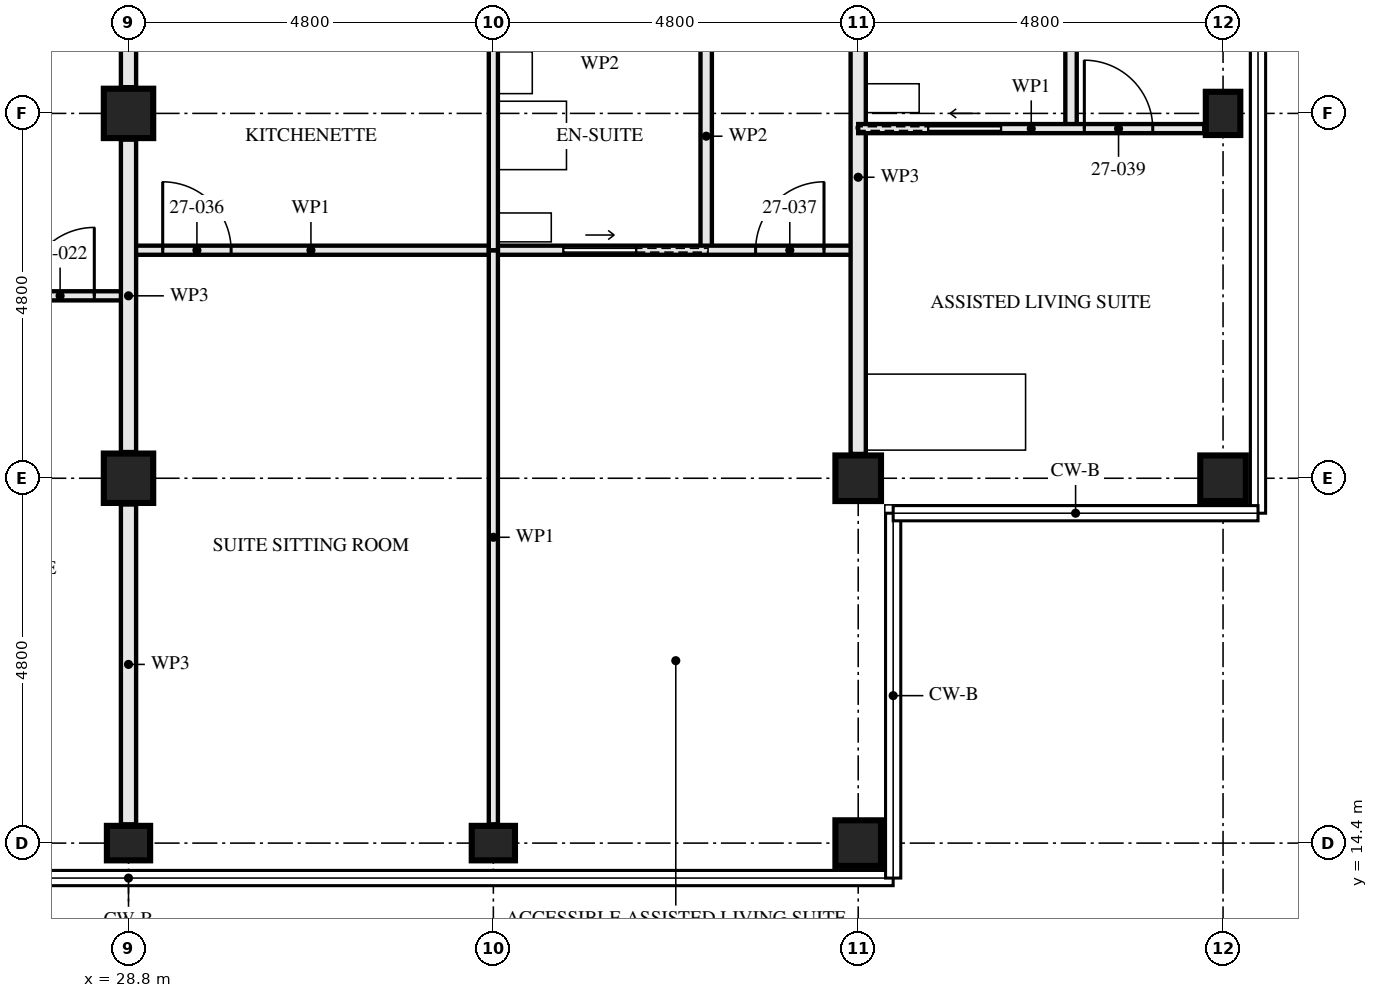
"""IFC4 building model, lengths in metres.
Left out: names, types, materials, properties, quantities, classifications, styles, units other than length and angle.
Written with IfcOpenShell. Run it as: python <this file> out.ifc"""

import sys

from ifc_helpers import new_model, si_unit, direction, frame, frame_2d, origin, origin_2d, place, context, subcontext, project, spatial, rectangle, hollow_rectangle, i_section, extrude, element, fill, save


model = new_model("IFC4")
c1 = context("Model", 3, precision=1e-05, world=origin(), true_north=direction((0.0, 1.0)))
c2 = subcontext(c1, "Body", "Model", "MODEL_VIEW")
j1 = project(units=[si_unit("LENGTHUNIT", "METRE"), si_unit("PLANEANGLEUNIT", "RADIAN")], contexts=[c1])
p1 = place(None, origin())
s1 = spatial("IfcSite", under=j1, at=p1, CompositionType="ELEMENT")
p2 = place(p1, origin())
s2 = spatial("IfcBuilding", under=s1, at=p2, CompositionType="ELEMENT")
p3 = place(p2, frame((0.0, 0.0, 101.5)))
s3 = spatial("IfcBuildingStorey", under=s2, at=p3, CompositionType="ELEMENT", Elevation=101.5)
p4 = place(p3, frame((28.8, 14.4, 0.0), z_axis=(0.0, 0.0, 1.0), x_axis=(0.0, 1.0, 0.0)))
e1 = element("IfcColumn", 1, at=p4, inside=s3, PredefinedType="COLUMN", context=c2, shape_type="SweptSolid", body=[
    extrude(i_section(OverallWidth=0.454, OverallDepth=0.569, WebThickness=0.078, FlangeThickness=0.125, FilletRadius=0.015, at=origin_2d()), origin(), (0.0, 0.0, 1.0), 3.5),
])
for number, where, z_axis, x_axis in (
    (2, (28.8, 19.2, 0.0), (0.0, 0.0, 1.0), (1.0, 0.0, 0.0)),
    (3, (28.8, 24.0, 0.0), (0.0, 0.0, 1.0), (1.0, 0.0, 0.0)),
):
    element("IfcColumn", number, at=place(p3, frame(where, z_axis=z_axis, x_axis=x_axis)), inside=s3, PredefinedType="COLUMN", context=c2, shape_type="SweptSolid", body=[
        extrude(hollow_rectangle(XDim=0.65, YDim=0.65, WallThickness=0.05, at=origin_2d()), origin(), (0.0, 0.0, 1.0), 3.5),
    ])
p5 = place(p3, frame((33.6, 14.4, 0.0), z_axis=(0.0, 0.0, 1.0), x_axis=(0.0, 1.0, 0.0)))
e4 = element("IfcColumn", 4, at=p5, inside=s3, PredefinedType="COLUMN", context=c2, shape_type="SweptSolid", body=[
    extrude(i_section(OverallWidth=0.454, OverallDepth=0.569, WebThickness=0.078, FlangeThickness=0.125, FilletRadius=0.015, at=origin_2d()), origin(), (0.0, 0.0, 1.0), 3.5),
])
for number, where, z_axis, x_axis in (
    (5, (38.4, 14.4, 0.0), (0.0, 0.0, 1.0), (0.0, 1.0, 0.0)),
    (6, (38.4, 19.2, 0.0), (0.0, 0.0, 1.0), (0.0, 1.0, 0.0)),
    (7, (43.2, 19.2, 0.0), (0.0, 0.0, 1.0), (0.0, 1.0, 0.0)),
):
    element("IfcColumn", number, at=place(p3, frame(where, z_axis=z_axis, x_axis=x_axis)), inside=s3, PredefinedType="COLUMN", context=c2, shape_type="SweptSolid", body=[
        extrude(hollow_rectangle(XDim=0.6, YDim=0.6, WallThickness=0.05, at=origin_2d()), origin(), (0.0, 0.0, 1.0), 3.5),
    ])
p6 = place(p3, frame((43.2, 24.0, 0.0), z_axis=(0.0, 0.0, 1.0), x_axis=(1.0, 0.0, 0.0)))
e8 = element("IfcColumn", 8, at=p6, inside=s3, PredefinedType="COLUMN", context=c2, shape_type="SweptSolid", body=[
    extrude(i_section(OverallWidth=0.454, OverallDepth=0.569, WebThickness=0.078, FlangeThickness=0.125, FilletRadius=0.015, at=origin_2d()), origin(), (0.0, 0.0, 1.0), 3.5),
])
p7 = place(p3, frame((24.0, 21.6, 0.0), z_axis=(0.0, 0.0, 1.0), x_axis=(1.0, 0.0, 0.0)))
e9 = element("IfcWall", 9, at=p7, inside=s3, PredefinedType="PARTITIONING", context=c2, shape_type="SweptSolid", body=[
    extrude(rectangle(XDim=4.8, YDim=0.12, at=frame_2d((2.4, 0.0))), origin(), (0.0, 0.0, 1.0), 3.33),
])
p8 = place(p7, frame((3.45, 0.0, 0.0)))
e10 = element("IfcOpeningElement", 10, at=p8, cuts=e9, PredefinedType="OPENING", context=c2, shape_type="SweptSolid", body=[
    extrude(rectangle(XDim=0.9, YDim=2.1, at=frame_2d((0.45, 1.05))), frame((0.0, 0.071, 0.0), z_axis=(0.0, -1.0, 0.0), x_axis=(1.0, 0.0, 0.0)), (0.0, 0.0, 1.0), 0.141),
])
p9 = place(p7, frame((0.925, 0.0, 0.0)))
e11 = element("IfcOpeningElement", 11, at=p9, cuts=e9, PredefinedType="OPENING", context=c2, shape_type="SweptSolid", body=[
    extrude(rectangle(XDim=0.95, YDim=2.1, at=frame_2d((0.475, 1.05))), frame((0.0, 0.071, 0.0), z_axis=(0.0, -1.0, 0.0), x_axis=(1.0, 0.0, 0.0)), (0.0, 0.0, 1.0), 0.141),
])
p10 = place(p3, frame((36.4, 22.2, 0.0), z_axis=(0.0, 0.0, 1.0), x_axis=(0.0, 1.0, 0.0)))
e12 = element("IfcWall", 12, at=p10, inside=s3, PredefinedType="PARTITIONING", context=c2, shape_type="SweptSolid", body=[
    extrude(rectangle(XDim=3.0, YDim=0.15, at=frame_2d((1.5, 0.0))), origin(), (0.0, 0.0, 1.0), 2.55),
])
p11 = place(p3, frame((33.6, 22.2, 0.0), z_axis=(0.0, 0.0, 1.0), x_axis=(0.0, 1.0, 0.0)))
e13 = element("IfcWall", 13, at=p11, inside=s3, PredefinedType="PARTITIONING", context=c2, shape_type="SweptSolid", body=[
    extrude(rectangle(XDim=4.65, YDim=0.12, at=frame_2d((2.325, 0.0))), origin(), (0.0, 0.0, 1.0), 2.55),
])
p12 = place(p11, frame((3.35, 0.0, 0.0)))
e14 = element("IfcOpeningElement", 14, at=p12, cuts=e13, PredefinedType="OPENING", context=c2, shape_type="SweptSolid", body=[
    extrude(rectangle(XDim=0.9, YDim=2.1, at=frame_2d((0.45, 1.05))), frame((0.0, 0.071, 0.0), z_axis=(0.0, -1.0, 0.0), x_axis=(1.0, 0.0, 0.0)), (0.0, 0.0, 1.0), 0.141),
])
p13 = place(p3, frame((28.8, 22.2, 0.0), z_axis=(0.0, 0.0, 1.0), x_axis=(1.0, 0.0, 0.0)))
e15 = element("IfcWall", 15, at=p13, inside=s3, PredefinedType="PARTITIONING", context=c2, shape_type="SweptSolid", body=[
    extrude(rectangle(XDim=4.8, YDim=0.12, at=frame_2d((2.4, 0.0))), origin(), (0.0, 0.0, 1.0), 3.33),
])
p14 = place(p13, frame((0.45, 0.0, 0.0)))
e16 = element("IfcOpeningElement", 16, at=p14, cuts=e15, PredefinedType="OPENING", context=c2, shape_type="SweptSolid", body=[
    extrude(rectangle(XDim=0.9, YDim=2.1, at=frame_2d((0.45, 1.05))), frame((0.0, 0.071, 0.0), z_axis=(0.0, -1.0, 0.0), x_axis=(1.0, 0.0, 0.0)), (0.0, 0.0, 1.0), 0.141),
])
p15 = place(p3, frame((33.6, 22.2, 0.0), z_axis=(0.0, 0.0, 1.0), x_axis=(1.0, 0.0, 0.0)))
e17 = element("IfcWall", 17, at=p15, inside=s3, PredefinedType="PARTITIONING", context=c2, shape_type="SweptSolid", body=[
    extrude(rectangle(XDim=4.8, YDim=0.12, at=frame_2d((2.4, 0.0))), origin(), (0.0, 0.0, 1.0), 3.33),
])
p16 = place(p15, frame((3.45, 0.0, 0.0)))
e18 = element("IfcOpeningElement", 18, at=p16, cuts=e17, PredefinedType="OPENING", context=c2, shape_type="SweptSolid", body=[
    extrude(rectangle(XDim=0.9, YDim=2.1, at=frame_2d((0.45, 1.05))), frame((0.0, 0.071, 0.0), z_axis=(0.0, -1.0, 0.0), x_axis=(1.0, 0.0, 0.0)), (0.0, 0.0, 1.0), 0.141),
])
p17 = place(p15, frame((0.925, 0.0, 0.0)))
e19 = element("IfcOpeningElement", 19, at=p17, cuts=e17, PredefinedType="OPENING", context=c2, shape_type="SweptSolid", body=[
    extrude(rectangle(XDim=0.95, YDim=2.1, at=frame_2d((0.475, 1.05))), frame((0.0, 0.071, 0.0), z_axis=(0.0, -1.0, 0.0), x_axis=(1.0, 0.0, 0.0)), (0.0, 0.0, 1.0), 0.141),
])
p18 = place(p3, frame((33.6, 14.647, 0.0), z_axis=(0.0, 0.0, 1.0), x_axis=(0.0, 1.0, 0.0)))
e20 = element("IfcWall", 20, at=p18, inside=s3, PredefinedType="PARTITIONING", context=c2, shape_type="SweptSolid", body=[
    extrude(rectangle(XDim=7.553, YDim=0.12, at=frame_2d((3.776, 0.0))), origin(), (0.0, 0.0, 1.0), 2.55),
])
p19 = place(p3, frame((38.4, 19.52, 0.0), z_axis=(0.0, 0.0, 1.0), x_axis=(0.0, 1.0, 0.0)))
e21 = element("IfcWall", 21, at=p19, inside=s3, PredefinedType="PARTITIONING", context=c2, shape_type="SweptSolid", body=[
    extrude(rectangle(XDim=7.28, YDim=0.2, at=frame_2d((3.64, 0.0))), origin(), (0.0, 0.0, 1.0), 2.55),
])
p20 = place(p3, frame((41.2, 23.8, 0.0), z_axis=(0.0, 0.0, 1.0), x_axis=(0.0, 1.0, 0.0)))
e22 = element("IfcWall", 22, at=p20, inside=s3, PredefinedType="PARTITIONING", context=c2, shape_type="SweptSolid", body=[
    extrude(rectangle(XDim=3.0, YDim=0.15, at=frame_2d((1.5, 0.0))), origin(), (0.0, 0.0, 1.0), 2.55),
])
p21 = place(p3, frame((38.4, 23.8, 0.0), z_axis=(0.0, 0.0, 1.0), x_axis=(1.0, 0.0, 0.0)))
e23 = element("IfcWall", 23, at=p21, inside=s3, PredefinedType="PARTITIONING", context=c2, shape_type="SweptSolid", body=[
    extrude(rectangle(XDim=4.553, YDim=0.12, at=frame_2d((2.276, 0.0))), origin(), (0.0, 0.0, 1.0), 3.33),
])
p22 = place(p21, frame((2.975, 0.0, 0.0)))
e24 = element("IfcOpeningElement", 24, at=p22, cuts=e23, PredefinedType="OPENING", context=c2, shape_type="SweptSolid", body=[
    extrude(rectangle(XDim=0.9, YDim=2.1, at=frame_2d((0.45, 1.05))), frame((0.0, 0.071, 0.0), z_axis=(0.0, -1.0, 0.0), x_axis=(1.0, 0.0, 0.0)), (0.0, 0.0, 1.0), 0.141),
])
p23 = place(p21, frame((0.925, 0.0, 0.0)))
e25 = element("IfcOpeningElement", 25, at=p23, cuts=e23, PredefinedType="OPENING", context=c2, shape_type="SweptSolid", body=[
    extrude(rectangle(XDim=0.95, YDim=2.1, at=frame_2d((0.475, 1.05))), frame((0.0, 0.071, 0.0), z_axis=(0.0, -1.0, 0.0), x_axis=(1.0, 0.0, 0.0)), (0.0, 0.0, 1.0), 0.141),
])
p24 = place(p3, frame((28.8, 14.647, 0.0), z_axis=(0.0, 0.0, 1.0), x_axis=(0.0, 1.0, 0.0)))
e26 = element("IfcWall", 26, at=p24, inside=s3, PredefinedType="PARTITIONING", context=c2, shape_type="SweptSolid", body=[
    extrude(rectangle(XDim=4.208, YDim=0.2, at=frame_2d((2.104, 0.0))), origin(), (0.0, 0.0, 1.0), 2.32),
])
p25 = place(p3, frame((28.8, 19.545, 0.0), z_axis=(0.0, 0.0, 1.0), x_axis=(0.0, 1.0, 0.0)))
e27 = element("IfcWall", 27, at=p25, inside=s3, PredefinedType="PARTITIONING", context=c2, shape_type="SweptSolid", body=[
    extrude(rectangle(XDim=4.11, YDim=0.2, at=frame_2d((2.055, 0.0))), origin(), (0.0, 0.0, 1.0), 2.32),
])
p26 = place(p3, frame((28.8, 24.345, 0.0), z_axis=(0.0, 0.0, 1.0), x_axis=(0.0, 1.0, 0.0)))
e28 = element("IfcWall", 28, at=p26, inside=s3, PredefinedType="PARTITIONING", context=c2, shape_type="SweptSolid", body=[
    extrude(rectangle(XDim=2.555, YDim=0.2, at=frame_2d((1.277, 0.0))), origin(), (0.0, 0.0, 1.0), 2.32),
])
p27 = place(p8, origin())
e29 = element("IfcDoor", 29, at=p27, inside=s3, OperationType="SINGLE_SWING_LEFT", PredefinedType="DOOR", context=c2, shape_type="SweptSolid", body=[
    extrude(rectangle(XDim=0.9, YDim=2.1, at=frame_2d((0.45, 1.05))), frame((0.0, 0.022, 0.0), z_axis=(0.0, -1.0, 0.0), x_axis=(1.0, 0.0, 0.0)), (0.0, 0.0, 1.0), 0.044),
])
fill(e10, e29)
p28 = place(p14, origin())
e30 = element("IfcDoor", 30, at=p28, inside=s3, OperationType="SINGLE_SWING_RIGHT", PredefinedType="DOOR", context=c2, shape_type="SweptSolid", body=[
    extrude(rectangle(XDim=0.9, YDim=2.1, at=frame_2d((0.45, 1.05))), frame((0.0, 0.022, 0.0), z_axis=(0.0, -1.0, 0.0), x_axis=(1.0, 0.0, 0.0)), (0.0, 0.0, 1.0), 0.044),
])
fill(e16, e30)
p29 = place(p16, origin())
e31 = element("IfcDoor", 31, at=p29, inside=s3, OperationType="SINGLE_SWING_LEFT", PredefinedType="DOOR", context=c2, shape_type="SweptSolid", body=[
    extrude(rectangle(XDim=0.9, YDim=2.1, at=frame_2d((0.45, 1.05))), frame((0.0, 0.022, 0.0), z_axis=(0.0, -1.0, 0.0), x_axis=(1.0, 0.0, 0.0)), (0.0, 0.0, 1.0), 0.044),
])
fill(e18, e31)
p30 = place(p17, origin())
e32 = element("IfcDoor", 32, at=p30, inside=s3, OperationType="SLIDING_TO_LEFT", PredefinedType="DOOR", context=c2, shape_type="SweptSolid", body=[
    extrude(rectangle(XDim=0.95, YDim=2.1, at=frame_2d((0.475, 1.05))), frame((0.0, 0.022, 0.0), z_axis=(0.0, -1.0, 0.0), x_axis=(1.0, 0.0, 0.0)), (0.0, 0.0, 1.0), 0.044),
])
fill(e19, e32)
p31 = place(p22, origin())
e33 = element("IfcDoor", 33, at=p31, inside=s3, OperationType="SINGLE_SWING_RIGHT", PredefinedType="DOOR", context=c2, shape_type="SweptSolid", body=[
    extrude(rectangle(XDim=0.9, YDim=2.1, at=frame_2d((0.45, 1.05))), frame((0.0, 0.022, 0.0), z_axis=(0.0, -1.0, 0.0), x_axis=(1.0, 0.0, 0.0)), (0.0, 0.0, 1.0), 0.044),
])
fill(e24, e33)
p32 = place(p23, origin())
e34 = element("IfcDoor", 34, at=p32, inside=s3, OperationType="SLIDING_TO_RIGHT", PredefinedType="DOOR", context=c2, shape_type="SweptSolid", body=[
    extrude(rectangle(XDim=0.95, YDim=2.1, at=frame_2d((0.475, 1.05))), frame((0.0, 0.022, 0.0), z_axis=(0.0, -1.0, 0.0), x_axis=(1.0, 0.0, 0.0)), (0.0, 0.0, 1.0), 0.044),
])
fill(e25, e34)
save(model, sys.argv[1])
